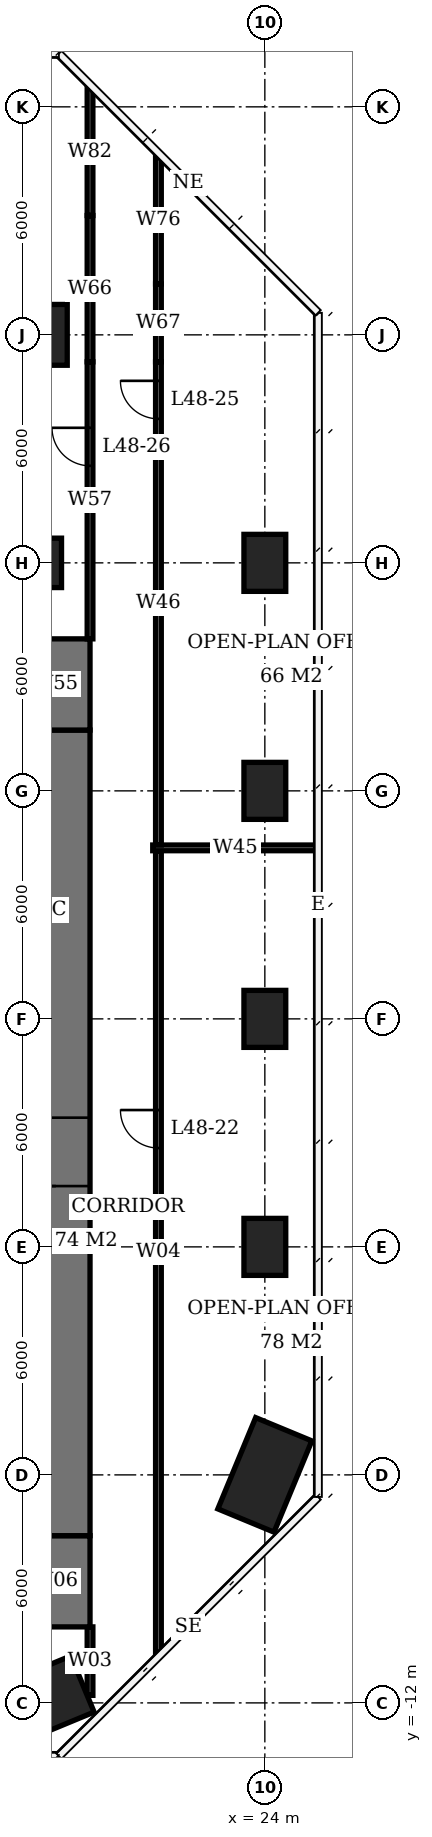
"""IFC4 building model, lengths in metres.
Left out: names, types, materials, properties, quantities, classifications, styles, units other than length and angle.
Written with IfcOpenShell. Run it as: python <this file> out.ifc"""

import sys

from ifc_helpers import new_model, si_unit, direction, frame, frame_2d, origin, origin_2d, place, context, subcontext, project, spatial, rectangle, extrude, element, fill, save


model = new_model("IFC4")
c1 = context("Model", 3, precision=1e-05, world=origin(), true_north=direction((0.0, 1.0)))
c2 = subcontext(c1, "Body", "Model", "MODEL_VIEW")
j1 = project(units=[si_unit("LENGTHUNIT", "METRE"), si_unit("PLANEANGLEUNIT", "RADIAN")], contexts=[c1])
p1 = place(None, origin())
s1 = spatial("IfcSite", under=j1, at=p1, CompositionType="ELEMENT")
p2 = place(p1, origin())
s2 = spatial("IfcBuilding", under=s1, at=p2, CompositionType="ELEMENT")
p3 = place(p2, frame((0.0, 0.0, 196.7)))
s3 = spatial("IfcBuildingStorey", under=s2, at=p3, CompositionType="ELEMENT", Elevation=196.7)
p4 = place(p3, frame((18.0, -12.0, 0.0), z_axis=(0.0, 0.0, 1.0), x_axis=(-0.923879532511, -0.382683432365, 0.0)))
e1 = element("IfcColumn", 1, at=p4, inside=s3, PredefinedType="COLUMN", context=c2, shape_type="SweptSolid", body=[
    extrude(rectangle(XDim=2.6, YDim=1.6, at=origin_2d()), origin(), (0.0, 0.0, 1.0), 3.9),
])
p5 = place(p3, frame((18.0, 18.0, 0.0), z_axis=(0.0, 0.0, 1.0), x_axis=(1.0, 0.0, 0.0)))
e2 = element("IfcColumn", 2, at=p5, inside=s3, PredefinedType="COLUMN", context=c2, shape_type="SweptSolid", body=[
    extrude(rectangle(XDim=1.3, YDim=1.3, at=origin_2d()), origin(), (0.0, 0.0, 1.0), 3.9),
])
p6 = place(p3, frame((18.0, 24.0, 0.0), z_axis=(0.0, 0.0, 1.0), x_axis=(1.0, 0.0, 0.0)))
e3 = element("IfcColumn", 3, at=p6, inside=s3, PredefinedType="COLUMN", context=c2, shape_type="SweptSolid", body=[
    extrude(rectangle(XDim=1.6, YDim=1.6, at=origin_2d()), origin(), (0.0, 0.0, 1.0), 3.9),
])
p7 = place(p3, frame((24.0, -6.0, 0.0), z_axis=(0.0, 0.0, 1.0), x_axis=(-0.382683432365, -0.923879532511, 0.0)))
e4 = element("IfcColumn", 4, at=p7, inside=s3, PredefinedType="COLUMN", context=c2, shape_type="SweptSolid", body=[
    extrude(rectangle(XDim=2.6, YDim=1.6, at=origin_2d()), origin(), (0.0, 0.0, 1.0), 3.9),
])
for number, where, z_axis, x_axis in (
    (5, (24.0, 0.0, 0.0), (0.0, 0.0, 1.0), (0.0, 1.0, 0.0)),
    (6, (24.0, 6.0, 0.0), (0.0, 0.0, 1.0), (0.0, 1.0, 0.0)),
    (7, (24.0, 12.0, 0.0), (0.0, 0.0, 1.0), (0.0, 1.0, 0.0)),
    (8, (24.0, 18.0, 0.0), (0.0, 0.0, 1.0), (0.0, 1.0, 0.0)),
):
    element("IfcColumn", number, at=place(p3, frame(where, z_axis=z_axis, x_axis=x_axis)), inside=s3, PredefinedType="COLUMN", context=c2, shape_type="SweptSolid", body=[
        extrude(rectangle(XDim=1.5, YDim=1.1, at=origin_2d()), origin(), (0.0, 0.0, 1.0), 3.9),
    ])
p8 = place(p3, frame((18.5, -7.6, 0.0), z_axis=(0.0, 0.0, 1.0), x_axis=(0.0, 1.0, 0.0)))
e9 = element("IfcWall", 9, at=p8, inside=s3, PredefinedType="SHEAR", context=c2, shape_type="SweptSolid", body=[
    extrude(rectangle(XDim=21.2, YDim=1.8, at=frame_2d((10.6, 0.0))), origin(), (0.0, 0.0, 1.0), 3.9),
])
p9 = place(p8, frame((9.2, 0.0, 0.0)))
e10 = element("IfcOpeningElement", 10, at=p9, cuts=e9, PredefinedType="OPENING", context=c2, shape_type="SweptSolid", body=[
    extrude(rectangle(XDim=1.8, YDim=2.4, at=frame_2d((0.9, 1.2))), frame((0.0, 0.91, 0.0), z_axis=(0.0, -1.0, 0.0), x_axis=(1.0, 0.0, 0.0)), (0.0, 0.0, 1.0), 1.82),
])
for number, where, z_axis, x_axis in (
    (11, (18.5, -10.0, 0.0), (0.0, 0.0, 1.0), (0.0, 1.0, 0.0)),
    (12, (18.5, 13.6, 0.0), (0.0, 0.0, 1.0), (0.0, 1.0, 0.0)),
):
    element("IfcWall", number, at=place(p3, frame(where, z_axis=z_axis, x_axis=x_axis)), inside=s3, PredefinedType="SHEAR", context=c2, shape_type="SweptSolid", body=[
        extrude(rectangle(XDim=2.4, YDim=1.8, at=frame_2d((1.2, 0.0))), origin(), (0.0, 0.0, 1.0), 3.9),
    ])
p10 = place(p3, frame((19.4, -11.802, 0.0), z_axis=(0.0, 0.0, 1.0), x_axis=(0.0, 1.0, 0.0)))
e13 = element("IfcWall", 13, at=p10, inside=s3, PredefinedType="PARTITIONING", context=c2, shape_type="SweptSolid", body=[
    extrude(rectangle(XDim=1.802, YDim=0.15, at=frame_2d((0.901, 0.0))), origin(), (0.0, 0.0, 1.0), 3.65),
])
p11 = place(p3, frame((19.4, 16.0, 0.0), z_axis=(0.0, 0.0, 1.0), x_axis=(0.0, 1.0, 0.0)))
e14 = element("IfcWall", 14, at=p11, inside=s3, PredefinedType="PARTITIONING", context=c2, shape_type="SweptSolid", body=[
    extrude(rectangle(XDim=7.29, YDim=0.15, at=frame_2d((3.645, 0.0))), origin(), (0.0, 0.0, 1.0), 3.65),
])
p12 = place(p11, frame((4.554, 0.0, 0.0)))
e15 = element("IfcOpeningElement", 15, at=p12, cuts=e14, PredefinedType="OPENING", context=c2, shape_type="SweptSolid", body=[
    extrude(rectangle(XDim=1.0, YDim=2.1, at=frame_2d((0.5, 1.05))), frame((0.0, 0.085, 0.0), z_axis=(0.0, -1.0, 0.0), x_axis=(1.0, 0.0, 0.0)), (0.0, 0.0, 1.0), 0.17),
])
p13 = place(p3, frame((19.4, 23.29, 0.0), z_axis=(0.0, 0.0, 1.0), x_axis=(0.0, 1.0, 0.0)))
e16 = element("IfcWall", 16, at=p13, inside=s3, PredefinedType="PARTITIONING", context=c2, shape_type="SweptSolid", body=[
    extrude(rectangle(XDim=3.85, YDim=0.15, at=frame_2d((1.925, 0.0))), origin(), (0.0, 0.0, 1.0), 2.65),
])
p14 = place(p3, frame((19.4, 27.14, 0.0), z_axis=(0.0, 0.0, 1.0), x_axis=(0.0, 1.0, 0.0)))
e17 = element("IfcWall", 17, at=p14, inside=s3, PredefinedType="PARTITIONING", context=c2, shape_type="SweptSolid", body=[
    extrude(rectangle(XDim=3.349, YDim=0.15, at=frame_2d((1.675, 0.0))), origin(), (0.0, 0.0, 1.0), 3.65),
])
p15 = place(p3, frame((21.2, -10.689, 0.0), z_axis=(0.0, 0.0, 1.0), x_axis=(0.0, 1.0, 0.0)))
e18 = element("IfcWall", 18, at=p15, inside=s3, PredefinedType="PARTITIONING", context=c2, shape_type="SweptSolid", body=[
    extrude(rectangle(XDim=21.114, YDim=0.15, at=frame_2d((10.557, 0.0))), origin(), (0.0, 0.0, 1.0), 3.65),
])
p16 = place(p15, frame((13.29, 0.0, 0.0)))
e19 = element("IfcOpeningElement", 19, at=p16, cuts=e18, PredefinedType="OPENING", context=c2, shape_type="SweptSolid", body=[
    extrude(rectangle(XDim=1.0, YDim=2.1, at=frame_2d((0.5, 1.05))), frame((0.0, 0.085, 0.0), z_axis=(0.0, -1.0, 0.0), x_axis=(1.0, 0.0, 0.0)), (0.0, 0.0, 1.0), 0.17),
])
p17 = place(p3, frame((21.2, 10.575, 0.0), z_axis=(0.0, 0.0, 1.0), x_axis=(0.0, 1.0, 0.0)))
e20 = element("IfcWall", 20, at=p17, inside=s3, PredefinedType="PARTITIONING", context=c2, shape_type="SweptSolid", body=[
    extrude(rectangle(XDim=12.715, YDim=0.15, at=frame_2d((6.357, 0.0))), origin(), (0.0, 0.0, 1.0), 3.65),
])
p18 = place(p17, frame((11.215, 0.0, 0.0)))
e21 = element("IfcOpeningElement", 21, at=p18, cuts=e20, PredefinedType="OPENING", context=c2, shape_type="SweptSolid", body=[
    extrude(rectangle(XDim=1.0, YDim=2.1, at=frame_2d((0.5, 1.05))), frame((0.0, 0.085, 0.0), z_axis=(0.0, -1.0, 0.0), x_axis=(1.0, 0.0, 0.0)), (0.0, 0.0, 1.0), 0.17),
])
p19 = place(p3, frame((21.2, 23.29, 0.0), z_axis=(0.0, 0.0, 1.0), x_axis=(0.0, 1.0, 0.0)))
e22 = element("IfcWall", 22, at=p19, inside=s3, PredefinedType="PARTITIONING", context=c2, shape_type="SweptSolid", body=[
    extrude(rectangle(XDim=2.05, YDim=0.15, at=frame_2d((1.025, 0.0))), origin(), (0.0, 0.0, 1.0), 2.65),
])
p20 = place(p3, frame((21.2, 25.34, 0.0), z_axis=(0.0, 0.0, 1.0), x_axis=(0.0, 1.0, 0.0)))
e23 = element("IfcWall", 23, at=p20, inside=s3, PredefinedType="PARTITIONING", context=c2, shape_type="SweptSolid", body=[
    extrude(rectangle(XDim=3.349, YDim=0.15, at=frame_2d((1.674, 0.0))), origin(), (0.0, 0.0, 1.0), 3.65),
])
p21 = place(p3, frame((21.05, 10.5, 0.0), z_axis=(0.0, 0.0, 1.0), x_axis=(1.0, 0.0, 0.0)))
e24 = element("IfcWall", 24, at=p21, inside=s3, PredefinedType="PARTITIONING", context=c2, shape_type="SweptSolid", body=[
    extrude(rectangle(XDim=4.35, YDim=0.15, at=frame_2d((2.175, 0.0))), origin(), (0.0, 0.0, 1.0), 3.65),
])
p22 = place(p9, origin())
e25 = element("IfcDoor", 25, at=p22, inside=s3, OperationType="DOUBLE_DOOR_SINGLE_SWING", PredefinedType="DOOR", context=c2, shape_type="SweptSolid", body=[
    extrude(rectangle(XDim=1.8, YDim=2.4, at=frame_2d((0.9, 1.2))), frame((0.0, 0.025, 0.0), z_axis=(0.0, -1.0, 0.0), x_axis=(1.0, 0.0, 0.0)), (0.0, 0.0, 1.0), 0.05),
])
fill(e10, e25)
p23 = place(p16, origin())
e26 = element("IfcDoor", 26, at=p23, inside=s3, OperationType="SINGLE_SWING_RIGHT", PredefinedType="DOOR", context=c2, shape_type="SweptSolid", body=[
    extrude(rectangle(XDim=1.0, YDim=2.1, at=frame_2d((0.5, 1.05))), frame((0.0, 0.025, 0.0), z_axis=(0.0, -1.0, 0.0), x_axis=(1.0, 0.0, 0.0)), (0.0, 0.0, 1.0), 0.05),
])
fill(e19, e26)
p24 = place(p18, origin())
e27 = element("IfcDoor", 27, at=p24, inside=s3, OperationType="SINGLE_SWING_RIGHT", PredefinedType="DOOR", context=c2, shape_type="SweptSolid", body=[
    extrude(rectangle(XDim=1.0, YDim=2.1, at=frame_2d((0.5, 1.05))), frame((0.0, 0.025, 0.0), z_axis=(0.0, -1.0, 0.0), x_axis=(1.0, 0.0, 0.0)), (0.0, 0.0, 1.0), 0.05),
])
fill(e21, e27)
p25 = place(p12, origin())
e28 = element("IfcDoor", 28, at=p25, inside=s3, OperationType="SINGLE_SWING_RIGHT", PredefinedType="DOOR", context=c2, shape_type="SweptSolid", body=[
    extrude(rectangle(XDim=1.0, YDim=2.1, at=frame_2d((0.5, 1.05))), frame((0.0, 0.025, 0.0), z_axis=(0.0, -1.0, 0.0), x_axis=(1.0, 0.0, 0.0)), (0.0, 0.0, 1.0), 0.05),
])
fill(e15, e28)
save(model, sys.argv[1])
